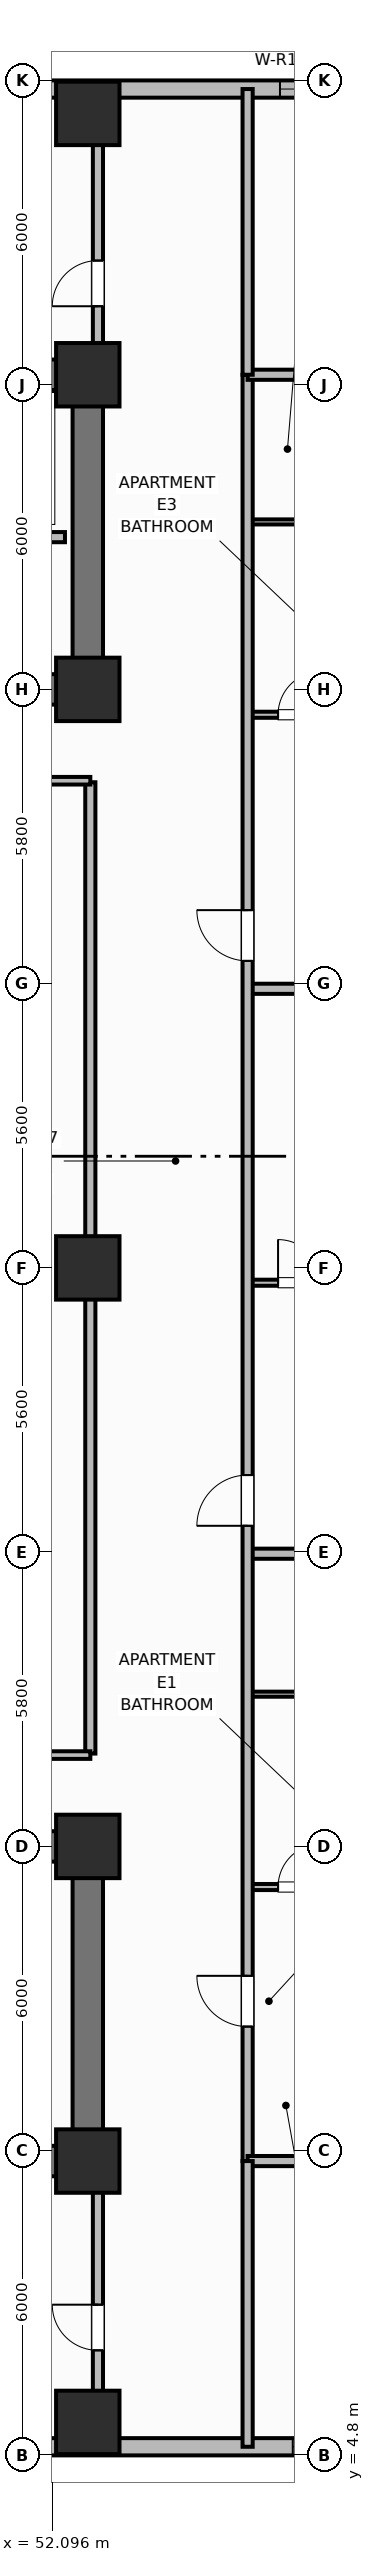
"""IFC4 building model, lengths in metres.
Left out: names, types, materials, properties, quantities, classifications, styles, units other than length and angle.
Written with IfcOpenShell. Run it as: python <this file> out.ifc"""

import sys

from ifc_helpers import new_model, si_unit, direction, frame, frame_2d, origin, origin_2d, place, context, subcontext, project, spatial, rectangle, extrude, element, fill, save


model = new_model("IFC4")
c1 = context("Model", 3, precision=1e-05, world=origin(), true_north=direction((0.0, 1.0)))
c2 = subcontext(c1, "Body", "Model", "MODEL_VIEW")
j1 = project(units=[si_unit("LENGTHUNIT", "METRE"), si_unit("PLANEANGLEUNIT", "RADIAN")], contexts=[c1])
p1 = place(None, origin())
s1 = spatial("IfcSite", under=j1, at=p1, CompositionType="ELEMENT")
p2 = place(p1, origin())
s2 = spatial("IfcBuilding", under=s1, at=p2, CompositionType="ELEMENT")
p3 = place(p2, frame((0.0, 0.0, 32.5)))
s3 = spatial("IfcBuildingStorey", under=s2, at=p3, CompositionType="ELEMENT", Elevation=32.5)
p4 = place(p3, frame((52.8, 10.6, 0.0), z_axis=(0.0, 0.0, 1.0), x_axis=(-1.0, 0.0, 0.0)))
e1 = element("IfcWall", 1, at=p4, inside=s3, PredefinedType="SHEAR", context=c2, shape_type="SweptSolid", body=[
    extrude(rectangle(XDim=27.2, YDim=0.6, at=frame_2d((13.6, 0.0))), origin(), (0.0, 0.0, 1.0), 3.7),
])
p5 = place(p3, frame((52.8, 10.9, 0.0), z_axis=(0.0, 0.0, 1.0), x_axis=(0.0, 1.0, 0.0)))
e2 = element("IfcWall", 2, at=p5, inside=s3, PredefinedType="SHEAR", context=c2, shape_type="SweptSolid", body=[
    extrude(rectangle(XDim=5.6, YDim=0.6, at=frame_2d((2.8, 0.0))), origin(), (0.0, 0.0, 1.0), 3.7),
])
p6 = place(p3, frame((25.6, 16.8, 0.0), z_axis=(0.0, 0.0, 1.0), x_axis=(1.0, 0.0, 0.0)))
e3 = element("IfcWall", 3, at=p6, inside=s3, PredefinedType="SHEAR", context=c2, shape_type="SweptSolid", body=[
    extrude(rectangle(XDim=27.2, YDim=0.6, at=frame_2d((13.6, 0.0))), origin(), (0.0, 0.0, 1.0), 3.7),
])
p7 = place(p6, frame((1.9, 0.0, 0.0)))
e4 = element("IfcOpeningElement", 4, at=p7, cuts=e3, PredefinedType="OPENING", context=c2, shape_type="SweptSolid", body=[
    extrude(rectangle(XDim=1.1, YDim=2.15, at=frame_2d((0.55, 1.075))), frame((0.0, 0.31, 0.0), z_axis=(0.0, -1.0, 0.0), x_axis=(1.0, 0.0, 0.0)), (0.0, 0.0, 1.0), 0.62),
])
p8 = place(p6, frame((13.0, 0.0, 0.0)))
e5 = element("IfcOpeningElement", 5, at=p8, cuts=e3, PredefinedType="OPENING", context=c2, shape_type="SweptSolid", body=[
    extrude(rectangle(XDim=1.2, YDim=2.15, at=frame_2d((0.6, 1.075))), frame((0.0, 0.31, 0.0), z_axis=(0.0, -1.0, 0.0), x_axis=(1.0, 0.0, 0.0)), (0.0, 0.0, 1.0), 0.62),
])
p9 = place(p6, frame((20.4, 0.0, 0.0)))
e6 = element("IfcOpeningElement", 6, at=p9, cuts=e3, PredefinedType="OPENING", context=c2, shape_type="SweptSolid", body=[
    extrude(rectangle(XDim=1.3, YDim=2.2, at=frame_2d((0.65, 1.1))), frame((0.0, 0.31, 0.0), z_axis=(0.0, -1.0, 0.0), x_axis=(1.0, 0.0, 0.0)), (0.0, 0.0, 1.0), 0.62),
])
p10 = place(p6, frame((24.65, 0.0, 0.0)))
e7 = element("IfcOpeningElement", 7, at=p10, cuts=e3, PredefinedType="OPENING", context=c2, shape_type="SweptSolid", body=[
    extrude(rectangle(XDim=0.85, YDim=2.1, at=frame_2d((0.425, 1.05))), frame((0.0, 0.31, 0.0), z_axis=(0.0, -1.0, 0.0), x_axis=(1.0, 0.0, 0.0)), (0.0, 0.0, 1.0), 0.62),
])
p11 = place(p3, frame((25.6, 45.8, 0.0), z_axis=(0.0, 0.0, 1.0), x_axis=(1.0, 0.0, 0.0)))
e8 = element("IfcWall", 8, at=p11, inside=s3, PredefinedType="SHEAR", context=c2, shape_type="SweptSolid", body=[
    extrude(rectangle(XDim=27.2, YDim=0.6, at=frame_2d((13.6, 0.0))), origin(), (0.0, 0.0, 1.0), 3.7),
])
p12 = place(p3, frame((52.8, 39.9, 0.0), z_axis=(0.0, 0.0, 1.0), x_axis=(0.0, 1.0, 0.0)))
e9 = element("IfcWall", 9, at=p12, inside=s3, PredefinedType="SHEAR", context=c2, shape_type="SweptSolid", body=[
    extrude(rectangle(XDim=5.6, YDim=0.6, at=frame_2d((2.8, 0.0))), origin(), (0.0, 0.0, 1.0), 3.7),
])
p13 = place(p3, frame((52.8, 39.6, 0.0), z_axis=(0.0, 0.0, 1.0), x_axis=(-1.0, 0.0, 0.0)))
e10 = element("IfcWall", 10, at=p13, inside=s3, PredefinedType="SHEAR", context=c2, shape_type="SweptSolid", body=[
    extrude(rectangle(XDim=27.2, YDim=0.6, at=frame_2d((13.6, 0.0))), origin(), (0.0, 0.0, 1.0), 3.7),
])
p14 = place(p13, frame((24.2, 0.0, 0.0)))
e11 = element("IfcOpeningElement", 11, at=p14, cuts=e10, PredefinedType="OPENING", context=c2, shape_type="SweptSolid", body=[
    extrude(rectangle(XDim=1.1, YDim=2.15, at=frame_2d((0.55, 1.075))), frame((0.0, 0.31, 0.0), z_axis=(0.0, -1.0, 0.0), x_axis=(1.0, 0.0, 0.0)), (0.0, 0.0, 1.0), 0.62),
])
p15 = place(p13, frame((15.1, 0.0, 0.0)))
e12 = element("IfcOpeningElement", 12, at=p15, cuts=e10, PredefinedType="OPENING", context=c2, shape_type="SweptSolid", body=[
    extrude(rectangle(XDim=1.2, YDim=2.15, at=frame_2d((0.6, 1.075))), frame((0.0, 0.31, 0.0), z_axis=(0.0, -1.0, 0.0), x_axis=(1.0, 0.0, 0.0)), (0.0, 0.0, 1.0), 0.62),
])
p16 = place(p13, frame((11.6, 0.0, 0.0)))
e13 = element("IfcOpeningElement", 13, at=p16, cuts=e10, PredefinedType="OPENING", context=c2, shape_type="SweptSolid", body=[
    extrude(rectangle(XDim=0.9, YDim=2.1, at=frame_2d((0.45, 1.05))), frame((0.0, 0.31, 0.0), z_axis=(0.0, -1.0, 0.0), x_axis=(1.0, 0.0, 0.0)), (0.0, 0.0, 1.0), 0.62),
])
p17 = place(p13, frame((3.6, 0.0, 0.0)))
e14 = element("IfcOpeningElement", 14, at=p17, cuts=e10, PredefinedType="OPENING", context=c2, shape_type="SweptSolid", body=[
    extrude(rectangle(XDim=1.0, YDim=2.15, at=frame_2d((0.5, 1.075))), frame((0.0, 0.31, 0.0), z_axis=(0.0, -1.0, 0.0), x_axis=(1.0, 0.0, 0.0)), (0.0, 0.0, 1.0), 0.62),
])
for number, where, z_axis, x_axis in (
    (15, (52.8, 10.6, 0.0), (0.0, 0.0, 1.0), (1.0, 0.0, 0.0)),
    (16, (52.8, 16.8, 0.0), (0.0, 0.0, 1.0), (1.0, 0.0, 0.0)),
    (17, (52.8, 39.6, 0.0), (0.0, 0.0, 1.0), (1.0, 0.0, 0.0)),
    (18, (52.8, 45.8, 0.0), (0.0, 0.0, 1.0), (1.0, 0.0, 0.0)),
    (19, (52.8, 28.2, 0.0), (0.0, 0.0, 1.0), (1.0, 0.0, 0.0)),
    (20, (52.8, 5.45, 0.0), (0.0, 0.0, 1.0), (1.0, 0.0, 0.0)),
    (21, (52.8, 50.95, 0.0), (0.0, 0.0, 1.0), (1.0, 0.0, 0.0)),
):
    element("IfcColumn", number, at=place(p3, frame(where, z_axis=z_axis, x_axis=x_axis)), inside=s3, PredefinedType="COLUMN", context=c2, shape_type="SweptSolid", body=[
        extrude(rectangle(XDim=1.25, YDim=1.25, at=origin_2d()), origin(), (0.0, 0.0, 1.0), 3.7),
    ])
p18 = place(p3, frame((42.4, 4.97, 0.0), z_axis=(0.0, 0.0, 1.0), x_axis=(1.0, 0.0, 0.0)))
e22 = element("IfcWall", 22, at=p18, inside=s3, PredefinedType="SOLIDWALL", context=c2, shape_type="SweptSolid", body=[
    extrude(rectangle(XDim=17.4, YDim=0.34, at=frame_2d((8.7, 0.0))), origin(), (0.0, 0.0, 1.0), 2.7),
])
p19 = place(p18, frame((4.78, 0.0, 0.73)))
e23 = element("IfcOpeningElement", 23, at=p19, cuts=e22, PredefinedType="OPENING", context=c2, shape_type="SweptSolid", body=[
    extrude(rectangle(XDim=1.4, YDim=1.85, at=frame_2d((0.7, 0.925))), frame((0.0, 0.18, 0.0), z_axis=(0.0, -1.0, 0.0), x_axis=(1.0, 0.0, 0.0)), (0.0, 0.0, 1.0), 0.36),
])
p20 = place(p18, frame((7.65, 0.0, 0.73)))
e24 = element("IfcOpeningElement", 24, at=p20, cuts=e22, PredefinedType="OPENING", context=c2, shape_type="SweptSolid", body=[
    extrude(rectangle(XDim=1.4, YDim=1.85, at=frame_2d((0.7, 0.925))), frame((0.0, 0.18, 0.0), z_axis=(0.0, -1.0, 0.0), x_axis=(1.0, 0.0, 0.0)), (0.0, 0.0, 1.0), 0.36),
])
p21 = place(p18, frame((14.44, 0.0, 0.73)))
e25 = element("IfcOpeningElement", 25, at=p21, cuts=e22, PredefinedType="OPENING", context=c2, shape_type="SweptSolid", body=[
    extrude(rectangle(XDim=1.4, YDim=1.85, at=frame_2d((0.7, 0.925))), frame((0.0, 0.18, 0.0), z_axis=(0.0, -1.0, 0.0), x_axis=(1.0, 0.0, 0.0)), (0.0, 0.0, 1.0), 0.36),
])
p22 = place(p3, frame((59.8, 51.43, 0.0), z_axis=(0.0, 0.0, 1.0), x_axis=(-1.0, 0.0, 0.0)))
e26 = element("IfcWall", 26, at=p22, inside=s3, PredefinedType="SOLIDWALL", context=c2, shape_type="SweptSolid", body=[
    extrude(rectangle(XDim=17.4, YDim=0.34, at=frame_2d((8.7, 0.0))), origin(), (0.0, 0.0, 1.0), 2.7),
])
p23 = place(p22, frame((1.413, 0.0, 0.73)))
e27 = element("IfcOpeningElement", 27, at=p23, cuts=e26, PredefinedType="OPENING", context=c2, shape_type="SweptSolid", body=[
    extrude(rectangle(XDim=1.8, YDim=1.85, at=frame_2d((0.9, 0.925))), frame((0.0, 0.18, 0.0), z_axis=(0.0, -1.0, 0.0), x_axis=(1.0, 0.0, 0.0)), (0.0, 0.0, 1.0), 0.36),
])
p24 = place(p22, frame((9.812, 0.0, 0.73)))
e28 = element("IfcOpeningElement", 28, at=p24, cuts=e26, PredefinedType="OPENING", context=c2, shape_type="SweptSolid", body=[
    extrude(rectangle(XDim=1.8, YDim=1.85, at=frame_2d((0.9, 0.925))), frame((0.0, 0.18, 0.0), z_axis=(0.0, -1.0, 0.0), x_axis=(1.0, 0.0, 0.0)), (0.0, 0.0, 1.0), 0.36),
])
p25 = place(p3, frame((52.35, 42.6, 0.0), z_axis=(0.0, 0.0, 1.0), x_axis=(-1.0, 0.0, 0.0)))
e29 = element("IfcWall", 29, at=p25, inside=s3, PredefinedType="PARTITIONING", context=c2, shape_type="SweptSolid", body=[
    extrude(rectangle(XDim=8.8, YDim=0.2, at=frame_2d((4.4, 0.0))), origin(), (0.0, 0.0, 1.0), 2.53),
])
p26 = place(p3, frame((52.85, 18.63, 0.0), z_axis=(0.0, 0.0, 1.0), x_axis=(0.0, 1.0, 0.0)))
e30 = element("IfcWall", 30, at=p26, inside=s3, PredefinedType="PARTITIONING", context=c2, shape_type="SweptSolid", body=[
    extrude(rectangle(XDim=19.14, YDim=0.2, at=frame_2d((9.57, 0.0))), origin(), (0.0, 0.0, 1.0), 2.53),
])
for number, where, z_axis, x_axis in (
    (31, (40.35, 18.6, 0.0), (0.0, 0.0, 1.0), (1.0, 0.0, 0.0)),
    (32, (40.35, 37.8, 0.0), (0.0, 0.0, 1.0), (1.0, 0.0, 0.0)),
):
    element("IfcWall", number, at=place(p3, frame(where, z_axis=z_axis, x_axis=x_axis)), inside=s3, PredefinedType="PARTITIONING", context=c2, shape_type="SweptSolid", body=[
        extrude(rectangle(XDim=12.5, YDim=0.15, at=frame_2d((6.25, 0.0))), origin(), (0.0, 0.0, 1.0), 2.53),
    ])
p27 = place(p3, frame((55.95, 16.0, 0.0), z_axis=(0.0, 0.0, 1.0), x_axis=(1.0, 0.0, 0.0)))
e33 = element("IfcWall", 33, at=p27, inside=s3, PredefinedType="PARTITIONING", context=c2, shape_type="SweptSolid", body=[
    extrude(rectangle(XDim=2.25, YDim=0.12, at=frame_2d((1.125, 0.0))), origin(), (0.0, 0.0, 1.0), 2.53),
])
p28 = place(p27, frame((0.6, 0.0, 0.0)))
e34 = element("IfcOpeningElement", 34, at=p28, cuts=e33, PredefinedType="OPENING", context=c2, shape_type="SweptSolid", body=[
    extrude(rectangle(XDim=0.85, YDim=2.1, at=frame_2d((0.425, 1.05))), frame((0.0, 0.07, 0.0), z_axis=(0.0, -1.0, 0.0), x_axis=(1.0, 0.0, 0.0)), (0.0, 0.0, 1.0), 0.14),
])
p29 = place(p3, frame((55.95, 19.8, 0.0), z_axis=(0.0, 0.0, 1.0), x_axis=(1.0, 0.0, 0.0)))
e35 = element("IfcWall", 35, at=p29, inside=s3, PredefinedType="PARTITIONING", context=c2, shape_type="SweptSolid", body=[
    extrude(rectangle(XDim=2.25, YDim=0.1, at=frame_2d((1.125, 0.0))), origin(), (0.0, 0.0, 1.0), 2.53),
])
p30 = place(p3, frame((55.95, 22.568, 0.0), z_axis=(0.0, 0.0, 1.0), x_axis=(1.0, 0.0, 0.0)))
e36 = element("IfcWall", 36, at=p30, inside=s3, PredefinedType="PARTITIONING", context=c2, shape_type="SweptSolid", body=[
    extrude(rectangle(XDim=7.88, YDim=0.2, at=frame_2d((3.94, 0.0))), origin(), (0.0, 0.0, 1.0), 2.53),
])
p31 = place(p3, frame((55.95, 27.908, 0.0), z_axis=(0.0, 0.0, 1.0), x_axis=(1.0, 0.0, 0.0)))
e37 = element("IfcWall", 37, at=p31, inside=s3, PredefinedType="PARTITIONING", context=c2, shape_type="SweptSolid", body=[
    extrude(rectangle(XDim=2.25, YDim=0.12, at=frame_2d((1.125, 0.0))), origin(), (0.0, 0.0, 1.0), 2.53),
])
p32 = place(p31, frame((0.6, 0.0, 0.0)))
e38 = element("IfcOpeningElement", 38, at=p32, cuts=e37, PredefinedType="OPENING", context=c2, shape_type="SweptSolid", body=[
    extrude(rectangle(XDim=0.85, YDim=2.1, at=frame_2d((0.425, 1.05))), frame((0.0, 0.07, 0.0), z_axis=(0.0, -1.0, 0.0), x_axis=(1.0, 0.0, 0.0)), (0.0, 0.0, 1.0), 0.14),
])
p33 = place(p3, frame((55.95, 33.7, 0.0), z_axis=(0.0, 0.0, 1.0), x_axis=(1.0, 0.0, 0.0)))
e39 = element("IfcWall", 39, at=p33, inside=s3, PredefinedType="PARTITIONING", context=c2, shape_type="SweptSolid", body=[
    extrude(rectangle(XDim=7.88, YDim=0.2, at=frame_2d((3.94, 0.0))), origin(), (0.0, 0.0, 1.0), 2.53),
])
p34 = place(p3, frame((55.95, 39.1, 0.0), z_axis=(0.0, 0.0, 1.0), x_axis=(1.0, 0.0, 0.0)))
e40 = element("IfcWall", 40, at=p34, inside=s3, PredefinedType="PARTITIONING", context=c2, shape_type="SweptSolid", body=[
    extrude(rectangle(XDim=2.25, YDim=0.12, at=frame_2d((1.125, 0.0))), origin(), (0.0, 0.0, 1.0), 2.53),
])
p35 = place(p34, frame((0.6, 0.0, 0.0)))
e41 = element("IfcOpeningElement", 41, at=p35, cuts=e40, PredefinedType="OPENING", context=c2, shape_type="SweptSolid", body=[
    extrude(rectangle(XDim=0.85, YDim=2.1, at=frame_2d((0.425, 1.05))), frame((0.0, 0.07, 0.0), z_axis=(0.0, -1.0, 0.0), x_axis=(1.0, 0.0, 0.0)), (0.0, 0.0, 1.0), 0.14),
])
p36 = place(p3, frame((55.95, 42.9, 0.0), z_axis=(0.0, 0.0, 1.0), x_axis=(1.0, 0.0, 0.0)))
e42 = element("IfcWall", 42, at=p36, inside=s3, PredefinedType="PARTITIONING", context=c2, shape_type="SweptSolid", body=[
    extrude(rectangle(XDim=2.25, YDim=0.1, at=frame_2d((1.125, 0.0))), origin(), (0.0, 0.0, 1.0), 2.53),
])
p37 = place(p3, frame((55.95, 10.6, 0.0), z_axis=(0.0, 0.0, 1.0), x_axis=(0.0, 1.0, 0.0)))
e43 = element("IfcWall", 43, at=p37, inside=s3, PredefinedType="PARTITIONING", context=c2, shape_type="SweptSolid", body=[
    extrude(rectangle(XDim=35.2, YDim=0.2, at=frame_2d((17.6, 0.0))), origin(), (0.0, 0.0, 1.0), 2.53),
])
p38 = place(p37, frame((2.65, 0.0, 0.0)))
e44 = element("IfcOpeningElement", 44, at=p38, cuts=e43, PredefinedType="OPENING", context=c2, shape_type="SweptSolid", body=[
    extrude(rectangle(XDim=1.0, YDim=2.15, at=frame_2d((0.5, 1.075))), frame((0.0, 0.11, 0.0), z_axis=(0.0, -1.0, 0.0), x_axis=(1.0, 0.0, 0.0)), (0.0, 0.0, 1.0), 0.22),
])
p39 = place(p37, frame((12.518, 0.0, 0.0)))
e45 = element("IfcOpeningElement", 45, at=p39, cuts=e43, PredefinedType="OPENING", context=c2, shape_type="SweptSolid", body=[
    extrude(rectangle(XDim=1.0, YDim=2.15, at=frame_2d((0.5, 1.075))), frame((0.0, 0.11, 0.0), z_axis=(0.0, -1.0, 0.0), x_axis=(1.0, 0.0, 0.0)), (0.0, 0.0, 1.0), 0.22),
])
p40 = place(p37, frame((23.65, 0.0, 0.0)))
e46 = element("IfcOpeningElement", 46, at=p40, cuts=e43, PredefinedType="OPENING", context=c2, shape_type="SweptSolid", body=[
    extrude(rectangle(XDim=1.0, YDim=2.15, at=frame_2d((0.5, 1.075))), frame((0.0, 0.11, 0.0), z_axis=(0.0, -1.0, 0.0), x_axis=(1.0, 0.0, 0.0)), (0.0, 0.0, 1.0), 0.22),
])
for number, where, z_axis, x_axis in (
    (47, (55.95, 10.6, 0.0), (0.0, 0.0, 1.0), (1.0, 0.0, 0.0)),
    (48, (55.95, 45.8, 0.0), (0.0, 0.0, 1.0), (1.0, 0.0, 0.0)),
):
    element("IfcWall", number, at=place(p3, frame(where, z_axis=z_axis, x_axis=x_axis)), inside=s3, PredefinedType="PARTITIONING", context=c2, shape_type="SweptSolid", body=[
        extrude(rectangle(XDim=7.46, YDim=0.2, at=frame_2d((3.73, 0.0))), origin(), (0.0, 0.0, 1.0), 2.53),
    ])
p41 = place(p3, frame((55.95, 4.97, 0.0), z_axis=(0.0, 0.0, 1.0), x_axis=(0.0, 1.0, 0.0)))
e49 = element("IfcWall", 49, at=p41, inside=s3, PredefinedType="PARTITIONING", context=c2, shape_type="SweptSolid", body=[
    extrude(rectangle(XDim=5.63, YDim=0.2, at=frame_2d((2.815, 0.0))), origin(), (0.0, 0.0, 1.0), 2.53),
])
p42 = place(p3, frame((55.95, 45.8, 0.0), z_axis=(0.0, 0.0, 1.0), x_axis=(0.0, 1.0, 0.0)))
e50 = element("IfcWall", 50, at=p42, inside=s3, PredefinedType="PARTITIONING", context=c2, shape_type="SweptSolid", body=[
    extrude(rectangle(XDim=5.63, YDim=0.2, at=frame_2d((2.815, 0.0))), origin(), (0.0, 0.0, 1.0), 2.53),
])
p43 = place(p3, frame((53.0, 5.57, 0.0), z_axis=(0.0, 0.0, 1.0), x_axis=(0.0, 1.0, 0.0)))
e51 = element("IfcWall", 51, at=p43, inside=s3, PredefinedType="PARTITIONING", context=c2, shape_type="SweptSolid", body=[
    extrude(rectangle(XDim=4.73, YDim=0.2, at=frame_2d((2.365, 0.0))), origin(), (0.0, 0.0, 1.0), 2.53),
])
p44 = place(p43, frame((1.3, 0.0, 0.0)))
e52 = element("IfcOpeningElement", 52, at=p44, cuts=e51, PredefinedType="OPENING", context=c2, shape_type="SweptSolid", body=[
    extrude(rectangle(XDim=0.9, YDim=2.1, at=frame_2d((0.45, 1.05))), frame((0.0, 0.11, 0.0), z_axis=(0.0, -1.0, 0.0), x_axis=(1.0, 0.0, 0.0)), (0.0, 0.0, 1.0), 0.22),
])
p45 = place(p3, frame((53.0, 46.1, 0.0), z_axis=(0.0, 0.0, 1.0), x_axis=(0.0, 1.0, 0.0)))
e53 = element("IfcWall", 53, at=p45, inside=s3, PredefinedType="PARTITIONING", context=c2, shape_type="SweptSolid", body=[
    extrude(rectangle(XDim=4.73, YDim=0.2, at=frame_2d((2.365, 0.0))), origin(), (0.0, 0.0, 1.0), 2.53),
])
p46 = place(p45, frame((1.05, 0.0, 0.0)))
e54 = element("IfcOpeningElement", 54, at=p46, cuts=e53, PredefinedType="OPENING", context=c2, shape_type="SweptSolid", body=[
    extrude(rectangle(XDim=0.9, YDim=2.1, at=frame_2d((0.45, 1.05))), frame((0.0, 0.11, 0.0), z_axis=(0.0, -1.0, 0.0), x_axis=(1.0, 0.0, 0.0)), (0.0, 0.0, 1.0), 0.22),
])
p47 = place(p21, origin())
e55 = element("IfcWindow", 55, at=p47, inside=s3, PartitioningType="SINGLE_PANEL", PredefinedType="WINDOW", context=c2, shape_type="SweptSolid", body=[
    extrude(rectangle(XDim=1.4, YDim=1.85, at=frame_2d((0.7, 0.925))), frame((0.0, 0.03, 0.0), z_axis=(0.0, -1.0, 0.0), x_axis=(1.0, 0.0, 0.0)), (0.0, 0.0, 1.0), 0.06),
])
fill(e25, e55)
p48 = place(p23, origin())
e56 = element("IfcWindow", 56, at=p48, inside=s3, PartitioningType="SINGLE_PANEL", PredefinedType="WINDOW", context=c2, shape_type="SweptSolid", body=[
    extrude(rectangle(XDim=1.8, YDim=1.85, at=frame_2d((0.9, 0.925))), frame((0.0, 0.03, 0.0), z_axis=(0.0, -1.0, 0.0), x_axis=(1.0, 0.0, 0.0)), (0.0, 0.0, 1.0), 0.06),
])
fill(e27, e56)
p49 = place(p28, origin())
e57 = element("IfcDoor", 57, at=p49, inside=s3, OperationType="SINGLE_SWING_RIGHT", PredefinedType="DOOR", context=c2, shape_type="SweptSolid", body=[
    extrude(rectangle(XDim=0.85, YDim=2.1, at=frame_2d((0.425, 1.05))), frame((0.0, 0.025, 0.0), z_axis=(0.0, -1.0, 0.0), x_axis=(1.0, 0.0, 0.0)), (0.0, 0.0, 1.0), 0.05),
])
fill(e34, e57)
p50 = place(p32, origin())
e58 = element("IfcDoor", 58, at=p50, inside=s3, OperationType="SINGLE_SWING_LEFT", PredefinedType="DOOR", context=c2, shape_type="SweptSolid", body=[
    extrude(rectangle(XDim=0.85, YDim=2.1, at=frame_2d((0.425, 1.05))), frame((0.0, 0.025, 0.0), z_axis=(0.0, -1.0, 0.0), x_axis=(1.0, 0.0, 0.0)), (0.0, 0.0, 1.0), 0.05),
])
fill(e38, e58)
p51 = place(p35, origin())
e59 = element("IfcDoor", 59, at=p51, inside=s3, OperationType="SINGLE_SWING_RIGHT", PredefinedType="DOOR", context=c2, shape_type="SweptSolid", body=[
    extrude(rectangle(XDim=0.85, YDim=2.1, at=frame_2d((0.425, 1.05))), frame((0.0, 0.025, 0.0), z_axis=(0.0, -1.0, 0.0), x_axis=(1.0, 0.0, 0.0)), (0.0, 0.0, 1.0), 0.05),
])
fill(e41, e59)
p52 = place(p38, origin())
e60 = element("IfcDoor", 60, at=p52, inside=s3, OperationType="SINGLE_SWING_RIGHT", PredefinedType="DOOR", context=c2, shape_type="SweptSolid", body=[
    extrude(rectangle(XDim=1.0, YDim=2.15, at=frame_2d((0.5, 1.075))), frame((0.0, 0.025, 0.0), z_axis=(0.0, -1.0, 0.0), x_axis=(1.0, 0.0, 0.0)), (0.0, 0.0, 1.0), 0.05),
])
fill(e44, e60)
p53 = place(p39, origin())
e61 = element("IfcDoor", 61, at=p53, inside=s3, OperationType="SINGLE_SWING_LEFT", PredefinedType="DOOR", context=c2, shape_type="SweptSolid", body=[
    extrude(rectangle(XDim=1.0, YDim=2.15, at=frame_2d((0.5, 1.075))), frame((0.0, 0.025, 0.0), z_axis=(0.0, -1.0, 0.0), x_axis=(1.0, 0.0, 0.0)), (0.0, 0.0, 1.0), 0.05),
])
fill(e45, e61)
p54 = place(p40, origin())
e62 = element("IfcDoor", 62, at=p54, inside=s3, OperationType="SINGLE_SWING_RIGHT", PredefinedType="DOOR", context=c2, shape_type="SweptSolid", body=[
    extrude(rectangle(XDim=1.0, YDim=2.15, at=frame_2d((0.5, 1.075))), frame((0.0, 0.025, 0.0), z_axis=(0.0, -1.0, 0.0), x_axis=(1.0, 0.0, 0.0)), (0.0, 0.0, 1.0), 0.05),
])
fill(e46, e62)
p55 = place(p44, origin())
e63 = element("IfcDoor", 63, at=p55, inside=s3, OperationType="SINGLE_SWING_RIGHT", PredefinedType="DOOR", context=c2, shape_type="SweptSolid", body=[
    extrude(rectangle(XDim=0.9, YDim=2.1, at=frame_2d((0.45, 1.05))), frame((0.0, 0.025, 0.0), z_axis=(0.0, -1.0, 0.0), x_axis=(1.0, 0.0, 0.0)), (0.0, 0.0, 1.0), 0.05),
])
fill(e52, e63)
p56 = place(p46, origin())
e64 = element("IfcDoor", 64, at=p56, inside=s3, OperationType="SINGLE_SWING_LEFT", PredefinedType="DOOR", context=c2, shape_type="SweptSolid", body=[
    extrude(rectangle(XDim=0.9, YDim=2.1, at=frame_2d((0.45, 1.05))), frame((0.0, 0.025, 0.0), z_axis=(0.0, -1.0, 0.0), x_axis=(1.0, 0.0, 0.0)), (0.0, 0.0, 1.0), 0.05),
])
fill(e54, e64)
save(model, sys.argv[1])
